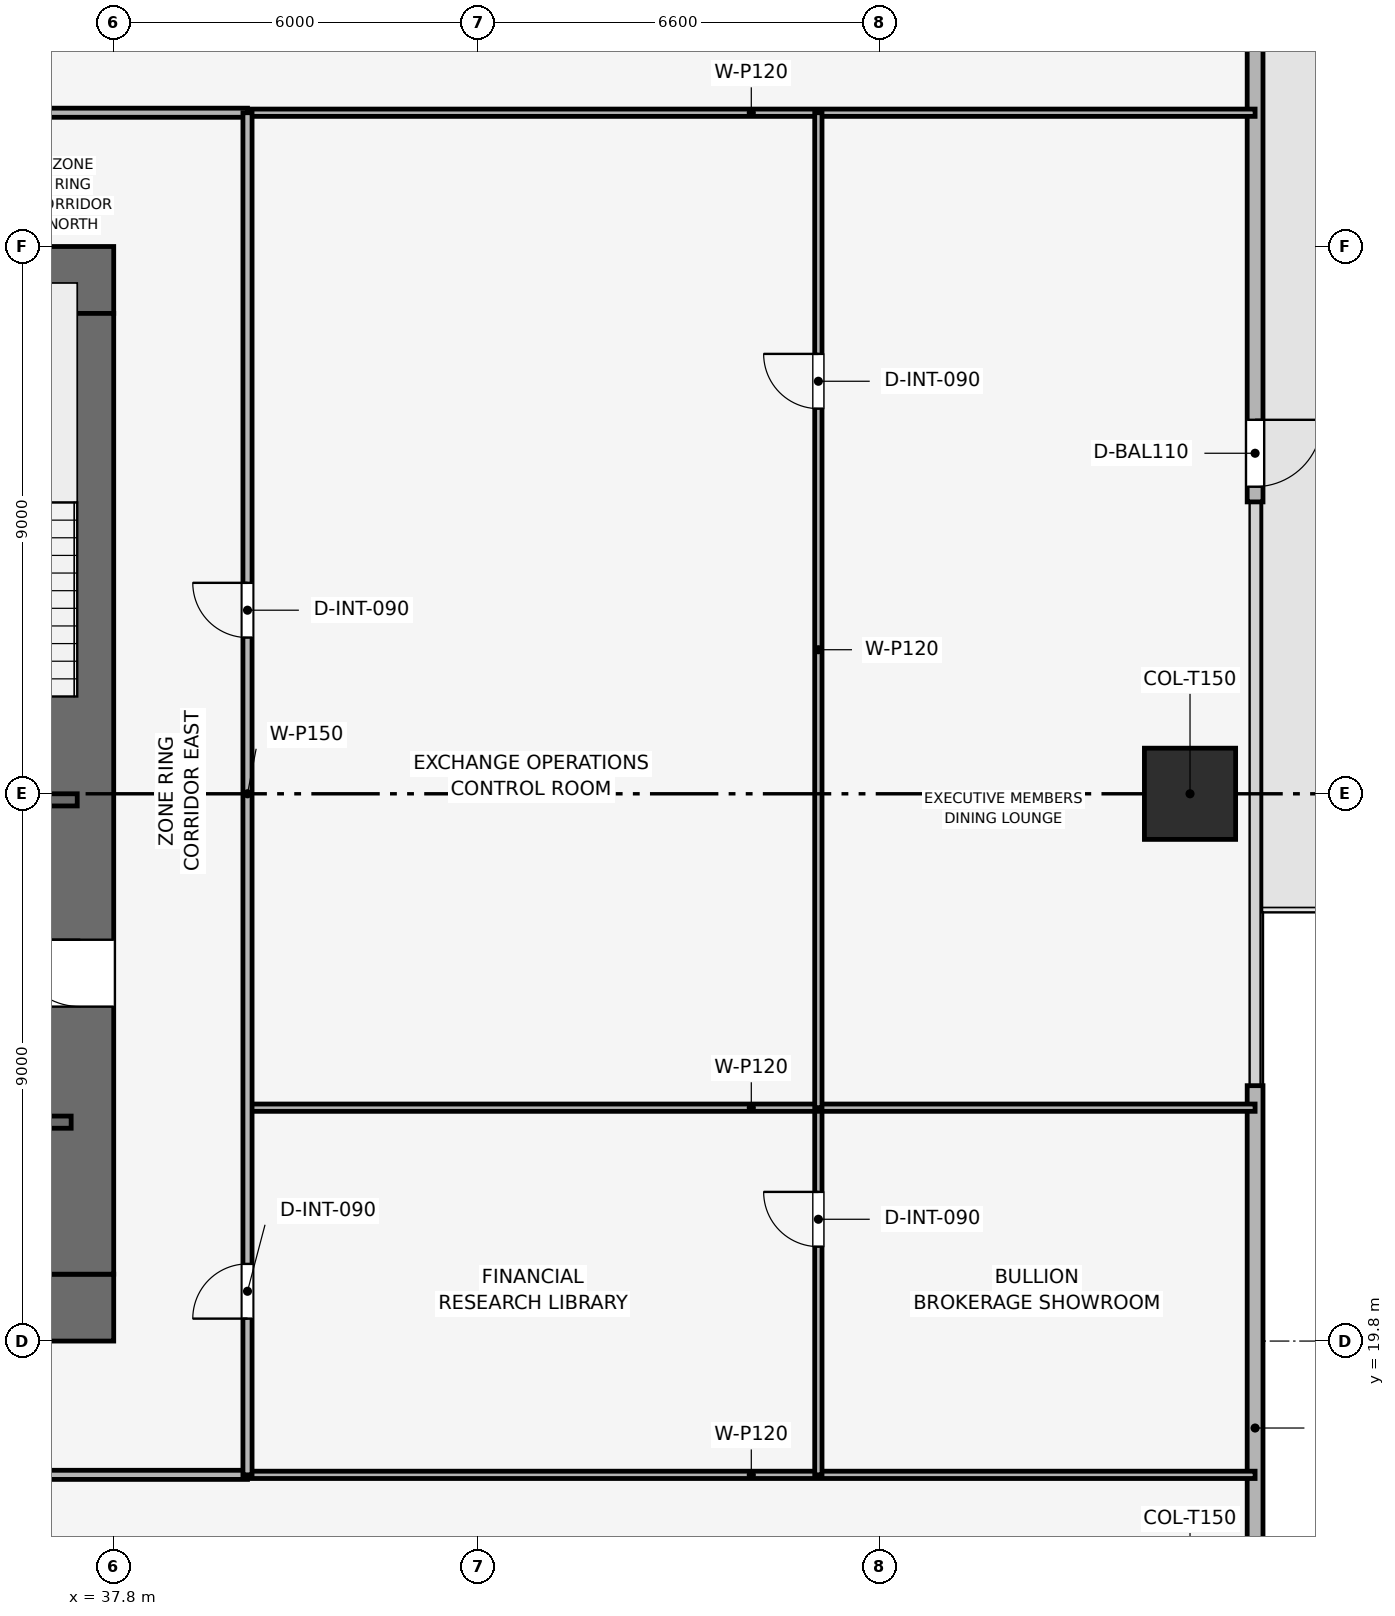
"""IFC4 building model, lengths in metres.
Left out: names, types, materials, properties, quantities, classifications, styles, units other than length and angle.
Written with IfcOpenShell. Run it as: python <this file> out.ifc"""

import sys

from ifc_helpers import new_model, si_unit, direction, frame, frame_2d, origin, origin_2d, place, context, subcontext, project, spatial, rectangle, extrude, element, fill, save


model = new_model("IFC4")
c1 = context("Model", 3, precision=1e-05, world=origin(), true_north=direction((0.0, 1.0)))
c2 = subcontext(c1, "Body", "Model", "MODEL_VIEW")
j1 = project(units=[si_unit("LENGTHUNIT", "METRE"), si_unit("PLANEANGLEUNIT", "RADIAN")], contexts=[c1])
p1 = place(None, origin())
s1 = spatial("IfcSite", under=j1, at=p1, CompositionType="ELEMENT")
p2 = place(p1, origin())
s2 = spatial("IfcBuilding", under=s1, at=p2, CompositionType="ELEMENT")
p3 = place(p2, frame((0.0, 0.0, 69.0)))
s3 = spatial("IfcBuildingStorey", under=s2, at=p3, CompositionType="ELEMENT", Elevation=69.0)
p4 = place(p3, frame((19.8, 20.35, 0.0), z_axis=(0.0, 0.0, 1.0), x_axis=(1.0, 0.0, 0.0)))
e1 = element("IfcWall", 1, at=p4, inside=s3, PredefinedType="SHEAR", context=c2, shape_type="SweptSolid", body=[
    extrude(rectangle(XDim=18.0, YDim=1.1, at=frame_2d((9.0, 0.0))), origin(), (0.0, 0.0, 1.0), 3.9),
])
p5 = place(p4, frame((8.4, 0.0, 0.0)))
e2 = element("IfcOpeningElement", 2, at=p5, cuts=e1, PredefinedType="OPENING", context=c2, shape_type="SweptSolid", body=[
    extrude(rectangle(XDim=1.2, YDim=2.2, at=frame_2d((0.6, 1.1))), frame((0.0, 0.56, 0.0), z_axis=(0.0, -1.0, 0.0), x_axis=(1.0, 0.0, 0.0)), (0.0, 0.0, 1.0), 1.12),
])
p6 = place(p3, frame((19.8, 37.25, 0.0), z_axis=(0.0, 0.0, 1.0), x_axis=(1.0, 0.0, 0.0)))
e3 = element("IfcWall", 3, at=p6, inside=s3, PredefinedType="SHEAR", context=c2, shape_type="SweptSolid", body=[
    extrude(rectangle(XDim=18.0, YDim=1.1, at=frame_2d((9.0, 0.0))), origin(), (0.0, 0.0, 1.0), 3.9),
])
p7 = place(p6, frame((7.05, 0.0, 0.0)))
e4 = element("IfcOpeningElement", 4, at=p7, cuts=e3, PredefinedType="OPENING", context=c2, shape_type="SweptSolid", body=[
    extrude(rectangle(XDim=1.1, YDim=2.15, at=frame_2d((0.55, 1.075))), frame((0.0, 0.56, 0.0), z_axis=(0.0, -1.0, 0.0), x_axis=(1.0, 0.0, 0.0)), (0.0, 0.0, 1.0), 1.12),
])
p8 = place(p3, frame((37.25, 20.9, 0.0), z_axis=(0.0, 0.0, 1.0), x_axis=(0.0, 1.0, 0.0)))
e5 = element("IfcWall", 5, at=p8, inside=s3, PredefinedType="SHEAR", context=c2, shape_type="SweptSolid", body=[
    extrude(rectangle(XDim=15.8, YDim=1.1, at=frame_2d((7.9, 0.0))), origin(), (0.0, 0.0, 1.0), 3.9),
])
p9 = place(p8, frame((4.4, 0.0, 0.0)))
e6 = element("IfcOpeningElement", 6, at=p9, cuts=e5, PredefinedType="OPENING", context=c2, shape_type="SweptSolid", body=[
    extrude(rectangle(XDim=1.1, YDim=2.15, at=frame_2d((0.55, 1.075))), frame((0.0, 0.56, 0.0), z_axis=(0.0, -1.0, 0.0), x_axis=(1.0, 0.0, 0.0)), (0.0, 0.0, 1.0), 1.12),
])
p10 = place(p3, frame((55.5, 28.8, 0.003), z_axis=(0.0, 0.0, 1.0), x_axis=(1.0, 0.0, 0.0)))
e7 = element("IfcColumn", 7, at=p10, inside=s3, PredefinedType="COLUMN", context=c2, shape_type="SweptSolid", body=[
    extrude(rectangle(XDim=1.5, YDim=1.5, at=origin_2d()), origin(), (0.0, 0.0, 1.0), 3.644),
])
p11 = place(p3, frame((56.57, 48.9, 0.0), z_axis=(0.0, 0.0, 1.0), x_axis=(0.0, -1.0, 0.0)))
e8 = element("IfcWall", 8, at=p11, inside=s3, PredefinedType="SOLIDWALL", context=c2, shape_type="SweptSolid", body=[
    extrude(rectangle(XDim=15.3, YDim=0.26, at=frame_2d((7.65, 0.0))), origin(), (0.0, 0.0, 1.0), 3.65),
])
p12 = place(p11, frame((13.95, 0.0, 0.0)))
e9 = element("IfcOpeningElement", 9, at=p12, cuts=e8, PredefinedType="OPENING", context=c2, shape_type="SweptSolid", body=[
    extrude(rectangle(XDim=1.1, YDim=2.2, at=frame_2d((0.55, 1.1))), frame((0.0, 0.14, 0.0), z_axis=(0.0, -1.0, 0.0), x_axis=(1.0, 0.0, 0.0)), (0.0, 0.0, 1.0), 0.28),
])
p13 = place(p3, frame((56.57, 24.0, 0.0), z_axis=(0.0, 0.0, 1.0), x_axis=(0.0, -1.0, 0.0)))
e10 = element("IfcWall", 10, at=p13, inside=s3, PredefinedType="SOLIDWALL", context=c2, shape_type="SweptSolid", body=[
    extrude(rectangle(XDim=15.3, YDim=0.26, at=frame_2d((7.65, 0.0))), origin(), (0.0, 0.0, 1.0), 3.65),
])
p14 = place(p13, frame((11.25, 0.0, 0.9)))
e11 = element("IfcOpeningElement", 11, at=p14, cuts=e10, PredefinedType="OPENING", context=c2, shape_type="SweptSolid", body=[
    extrude(rectangle(XDim=3.8, YDim=1.9, at=frame_2d((1.9, 0.95))), frame((0.0, 0.14, 0.0), z_axis=(0.0, -1.0, 0.0), x_axis=(1.0, 0.0, 0.0)), (0.0, 0.0, 1.0), 0.28),
])
p15 = place(p3, frame((34.05, 28.7, 0.0), z_axis=(0.0, 0.0, 1.0), x_axis=(1.0, 0.0, 0.0)))
e12 = element("IfcWall", 12, at=p15, inside=s3, PredefinedType="SHEAR", context=c2, shape_type="SweptSolid", body=[
    extrude(rectangle(XDim=3.15, YDim=0.2, at=frame_2d((1.575, 0.0))), origin(), (0.0, 0.0, 1.0), 3.65),
])
p16 = place(p15, frame((0.8, 0.0, 0.0)))
e13 = element("IfcOpeningElement", 13, at=p16, cuts=e12, PredefinedType="OPENING", context=c2, shape_type="SweptSolid", body=[
    extrude(rectangle(XDim=1.0, YDim=2.1, at=frame_2d((0.5, 1.05))), frame((0.0, 0.11, 0.0), z_axis=(0.0, -1.0, 0.0), x_axis=(1.0, 0.0, 0.0)), (0.0, 0.0, 1.0), 0.22),
])
p17 = place(p3, frame((34.05, 23.4, 0.0), z_axis=(0.0, 0.0, 1.0), x_axis=(1.0, 0.0, 0.0)))
e14 = element("IfcWall", 14, at=p17, inside=s3, PredefinedType="SHEAR", context=c2, shape_type="SweptSolid", body=[
    extrude(rectangle(XDim=3.05, YDim=0.2, at=frame_2d((1.525, 0.0))), origin(), (0.0, 0.0, 1.0), 3.65),
])
p18 = place(p17, frame((1.2, 0.0, 0.0)))
e15 = element("IfcOpeningElement", 15, at=p18, cuts=e14, PredefinedType="OPENING", context=c2, shape_type="SweptSolid", body=[
    extrude(rectangle(XDim=1.1, YDim=2.15, at=frame_2d((0.55, 1.075))), frame((0.0, 0.11, 0.0), z_axis=(0.0, -1.0, 0.0), x_axis=(1.0, 0.0, 0.0)), (0.0, 0.0, 1.0), 0.22),
])
for number, where, z_axis, x_axis in (
    (16, (40.0, 17.6, 0.0), (0.0, 0.0, 1.0), (1.0, 0.0, 0.0)),
    (17, (40.0, 40.0, 0.0), (0.0, 0.0, 1.0), (1.0, 0.0, 0.0)),
):
    element("IfcWall", number, at=place(p3, frame(where, z_axis=z_axis, x_axis=x_axis)), inside=s3, PredefinedType="PARTITIONING", context=c2, shape_type="SweptSolid", body=[
        extrude(rectangle(XDim=16.57, YDim=0.12, at=frame_2d((8.285, 0.0))), origin(), (0.0, 0.0, 1.0), 2.935),
    ])
p19 = place(p3, frame((49.388, 17.6, 0.0), z_axis=(0.0, 0.0, 1.0), x_axis=(0.0, 1.0, 0.0)))
e18 = element("IfcWall", 18, at=p19, inside=s3, PredefinedType="PARTITIONING", context=c2, shape_type="SweptSolid", body=[
    extrude(rectangle(XDim=6.038, YDim=0.12, at=frame_2d((3.019, 0.0))), origin(), (0.0, 0.0, 1.0), 3.085),
])
p20 = place(p19, frame((3.753, 0.0, 0.0)))
e19 = element("IfcOpeningElement", 19, at=p20, cuts=e18, PredefinedType="OPENING", context=c2, shape_type="SweptSolid", body=[
    extrude(rectangle(XDim=0.9, YDim=2.1, at=frame_2d((0.45, 1.05))), frame((0.0, 0.07, 0.0), z_axis=(0.0, -1.0, 0.0), x_axis=(1.0, 0.0, 0.0)), (0.0, 0.0, 1.0), 0.14),
])
p21 = place(p3, frame((40.0, 23.638, 0.0), z_axis=(0.0, 0.0, 1.0), x_axis=(1.0, 0.0, 0.0)))
e20 = element("IfcWall", 20, at=p21, inside=s3, PredefinedType="PARTITIONING", context=c2, shape_type="SweptSolid", body=[
    extrude(rectangle(XDim=16.57, YDim=0.12, at=frame_2d((8.285, 0.0))), origin(), (0.0, 0.0, 1.0), 2.935),
])
p22 = place(p3, frame((49.388, 23.638, 0.0), z_axis=(0.0, 0.0, 1.0), x_axis=(0.0, 1.0, 0.0)))
e21 = element("IfcWall", 21, at=p22, inside=s3, PredefinedType="PARTITIONING", context=c2, shape_type="SweptSolid", body=[
    extrude(rectangle(XDim=16.362, YDim=0.12, at=frame_2d((8.181, 0.0))), origin(), (0.0, 0.0, 1.0), 3.085),
])
p23 = place(p22, frame((11.496, 0.0, 0.0)))
e22 = element("IfcOpeningElement", 22, at=p23, cuts=e21, PredefinedType="OPENING", context=c2, shape_type="SweptSolid", body=[
    extrude(rectangle(XDim=0.9, YDim=2.1, at=frame_2d((0.45, 1.05))), frame((0.0, 0.07, 0.0), z_axis=(0.0, -1.0, 0.0), x_axis=(1.0, 0.0, 0.0)), (0.0, 0.0, 1.0), 0.14),
])
p24 = place(p3, frame((17.6, 17.6, 0.0), z_axis=(0.0, 0.0, 1.0), x_axis=(1.0, 0.0, 0.0)))
e23 = element("IfcWall", 23, at=p24, inside=s3, PredefinedType="PARTITIONING", context=c2, shape_type="SweptSolid", body=[
    extrude(rectangle(XDim=22.4, YDim=0.15, at=frame_2d((11.2, 0.0))), origin(), (0.0, 0.0, 1.0), 3.085),
])
p25 = place(p24, frame((0.7, 0.0, 0.0)))
e24 = element("IfcOpeningElement", 24, at=p25, cuts=e23, PredefinedType="OPENING", context=c2, shape_type="SweptSolid", body=[
    extrude(rectangle(XDim=0.9, YDim=2.1, at=frame_2d((0.45, 1.05))), frame((0.0, 0.085, 0.0), z_axis=(0.0, -1.0, 0.0), x_axis=(1.0, 0.0, 0.0)), (0.0, 0.0, 1.0), 0.17),
])
p26 = place(p24, frame((4.94, 0.0, 0.0)))
e25 = element("IfcOpeningElement", 25, at=p26, cuts=e23, PredefinedType="OPENING", context=c2, shape_type="SweptSolid", body=[
    extrude(rectangle(XDim=0.9, YDim=2.1, at=frame_2d((0.45, 1.05))), frame((0.0, 0.085, 0.0), z_axis=(0.0, -1.0, 0.0), x_axis=(1.0, 0.0, 0.0)), (0.0, 0.0, 1.0), 0.17),
])
p27 = place(p24, frame((10.912, 0.0, 0.0)))
e26 = element("IfcOpeningElement", 26, at=p27, cuts=e23, PredefinedType="OPENING", context=c2, shape_type="SweptSolid", body=[
    extrude(rectangle(XDim=0.9, YDim=2.1, at=frame_2d((0.45, 1.05))), frame((0.0, 0.085, 0.0), z_axis=(0.0, -1.0, 0.0), x_axis=(1.0, 0.0, 0.0)), (0.0, 0.0, 1.0), 0.17),
])
p28 = place(p24, frame((17.872, 0.0, 0.0)))
e27 = element("IfcOpeningElement", 27, at=p28, cuts=e23, PredefinedType="OPENING", context=c2, shape_type="SweptSolid", body=[
    extrude(rectangle(XDim=0.9, YDim=2.1, at=frame_2d((0.45, 1.05))), frame((0.0, 0.085, 0.0), z_axis=(0.0, -1.0, 0.0), x_axis=(1.0, 0.0, 0.0)), (0.0, 0.0, 1.0), 0.17),
])
p29 = place(p3, frame((17.6, 40.0, 0.0), z_axis=(0.0, 0.0, 1.0), x_axis=(1.0, 0.0, 0.0)))
e28 = element("IfcWall", 28, at=p29, inside=s3, PredefinedType="PARTITIONING", context=c2, shape_type="SweptSolid", body=[
    extrude(rectangle(XDim=22.4, YDim=0.15, at=frame_2d((11.2, 0.0))), origin(), (0.0, 0.0, 1.0), 3.085),
])
p30 = place(p29, frame((1.95, 0.0, 0.0)))
e29 = element("IfcOpeningElement", 29, at=p30, cuts=e28, PredefinedType="OPENING", context=c2, shape_type="SweptSolid", body=[
    extrude(rectangle(XDim=0.9, YDim=2.1, at=frame_2d((0.45, 1.05))), frame((0.0, 0.085, 0.0), z_axis=(0.0, -1.0, 0.0), x_axis=(1.0, 0.0, 0.0)), (0.0, 0.0, 1.0), 0.17),
])
p31 = place(p29, frame((5.75, 0.0, 0.0)))
e30 = element("IfcOpeningElement", 30, at=p31, cuts=e28, PredefinedType="OPENING", context=c2, shape_type="SweptSolid", body=[
    extrude(rectangle(XDim=0.9, YDim=2.1, at=frame_2d((0.45, 1.05))), frame((0.0, 0.085, 0.0), z_axis=(0.0, -1.0, 0.0), x_axis=(1.0, 0.0, 0.0)), (0.0, 0.0, 1.0), 0.17),
])
p32 = place(p29, frame((8.65, 0.0, 0.0)))
e31 = element("IfcOpeningElement", 31, at=p32, cuts=e28, PredefinedType="OPENING", context=c2, shape_type="SweptSolid", body=[
    extrude(rectangle(XDim=0.9, YDim=2.1, at=frame_2d((0.45, 1.05))), frame((0.0, 0.085, 0.0), z_axis=(0.0, -1.0, 0.0), x_axis=(1.0, 0.0, 0.0)), (0.0, 0.0, 1.0), 0.17),
])
p33 = place(p29, frame((11.4, 0.0, 0.0)))
e32 = element("IfcOpeningElement", 32, at=p33, cuts=e28, PredefinedType="OPENING", context=c2, shape_type="SweptSolid", body=[
    extrude(rectangle(XDim=0.95, YDim=2.1, at=frame_2d((0.475, 1.05))), frame((0.0, 0.085, 0.0), z_axis=(0.0, -1.0, 0.0), x_axis=(1.0, 0.0, 0.0)), (0.0, 0.0, 1.0), 0.17),
])
p34 = place(p29, frame((17.35, 0.0, 0.0)))
e33 = element("IfcOpeningElement", 33, at=p34, cuts=e28, PredefinedType="OPENING", context=c2, shape_type="SweptSolid", body=[
    extrude(rectangle(XDim=0.9, YDim=2.1, at=frame_2d((0.45, 1.05))), frame((0.0, 0.085, 0.0), z_axis=(0.0, -1.0, 0.0), x_axis=(1.0, 0.0, 0.0)), (0.0, 0.0, 1.0), 0.17),
])
p35 = place(p3, frame((40.0, 17.6, 0.0), z_axis=(0.0, 0.0, 1.0), x_axis=(0.0, 1.0, 0.0)))
e34 = element("IfcWall", 34, at=p35, inside=s3, PredefinedType="PARTITIONING", context=c2, shape_type="SweptSolid", body=[
    extrude(rectangle(XDim=22.4, YDim=0.15, at=frame_2d((11.2, 0.0))), origin(), (0.0, 0.0, 1.0), 3.085),
])
p36 = place(p35, frame((2.569, 0.0, 0.0)))
e35 = element("IfcOpeningElement", 35, at=p36, cuts=e34, PredefinedType="OPENING", context=c2, shape_type="SweptSolid", body=[
    extrude(rectangle(XDim=0.9, YDim=2.1, at=frame_2d((0.45, 1.05))), frame((0.0, 0.085, 0.0), z_axis=(0.0, -1.0, 0.0), x_axis=(1.0, 0.0, 0.0)), (0.0, 0.0, 1.0), 0.17),
])
p37 = place(p35, frame((13.769, 0.0, 0.0)))
e36 = element("IfcOpeningElement", 36, at=p37, cuts=e34, PredefinedType="OPENING", context=c2, shape_type="SweptSolid", body=[
    extrude(rectangle(XDim=0.9, YDim=2.1, at=frame_2d((0.45, 1.05))), frame((0.0, 0.085, 0.0), z_axis=(0.0, -1.0, 0.0), x_axis=(1.0, 0.0, 0.0)), (0.0, 0.0, 1.0), 0.17),
])
p38 = place(p12, origin())
e37 = element("IfcDoor", 37, at=p38, inside=s3, OperationType="SINGLE_SWING_LEFT", PredefinedType="DOOR", context=c2, shape_type="SweptSolid", body=[
    extrude(rectangle(XDim=1.1, YDim=2.2, at=frame_2d((0.55, 1.1))), frame((0.0, 0.025, 0.0), z_axis=(0.0, -1.0, 0.0), x_axis=(1.0, 0.0, 0.0)), (0.0, 0.0, 1.0), 0.05),
])
fill(e9, e37)
p39 = place(p20, origin())
e38 = element("IfcDoor", 38, at=p39, inside=s3, OperationType="SINGLE_SWING_RIGHT", PredefinedType="DOOR", context=c2, shape_type="SweptSolid", body=[
    extrude(rectangle(XDim=0.9, YDim=2.1, at=frame_2d((0.45, 1.05))), frame((0.0, 0.025, 0.0), z_axis=(0.0, -1.0, 0.0), x_axis=(1.0, 0.0, 0.0)), (0.0, 0.0, 1.0), 0.05),
])
fill(e19, e38)
p40 = place(p23, origin())
e39 = element("IfcDoor", 39, at=p40, inside=s3, OperationType="SINGLE_SWING_RIGHT", PredefinedType="DOOR", context=c2, shape_type="SweptSolid", body=[
    extrude(rectangle(XDim=0.9, YDim=2.1, at=frame_2d((0.45, 1.05))), frame((0.0, 0.025, 0.0), z_axis=(0.0, -1.0, 0.0), x_axis=(1.0, 0.0, 0.0)), (0.0, 0.0, 1.0), 0.05),
])
fill(e22, e39)
p41 = place(p36, origin())
e40 = element("IfcDoor", 40, at=p41, inside=s3, OperationType="SINGLE_SWING_LEFT", PredefinedType="DOOR", context=c2, shape_type="SweptSolid", body=[
    extrude(rectangle(XDim=0.9, YDim=2.1, at=frame_2d((0.45, 1.05))), frame((0.0, 0.025, 0.0), z_axis=(0.0, -1.0, 0.0), x_axis=(1.0, 0.0, 0.0)), (0.0, 0.0, 1.0), 0.05),
])
fill(e35, e40)
p42 = place(p37, origin())
e41 = element("IfcDoor", 41, at=p42, inside=s3, OperationType="SINGLE_SWING_RIGHT", PredefinedType="DOOR", context=c2, shape_type="SweptSolid", body=[
    extrude(rectangle(XDim=0.9, YDim=2.1, at=frame_2d((0.45, 1.05))), frame((0.0, 0.025, 0.0), z_axis=(0.0, -1.0, 0.0), x_axis=(1.0, 0.0, 0.0)), (0.0, 0.0, 1.0), 0.05),
])
fill(e36, e41)
p43 = place(p9, origin())
e42 = element("IfcDoor", 42, at=p43, inside=s3, OperationType="SINGLE_SWING_RIGHT", PredefinedType="DOOR", context=c2, shape_type="SweptSolid", body=[
    extrude(rectangle(XDim=1.1, YDim=2.15, at=frame_2d((0.55, 1.075))), frame((0.0, 0.025, 0.0), z_axis=(0.0, -1.0, 0.0), x_axis=(1.0, 0.0, 0.0)), (0.0, 0.0, 1.0), 0.05),
])
fill(e6, e42)
save(model, sys.argv[1])
